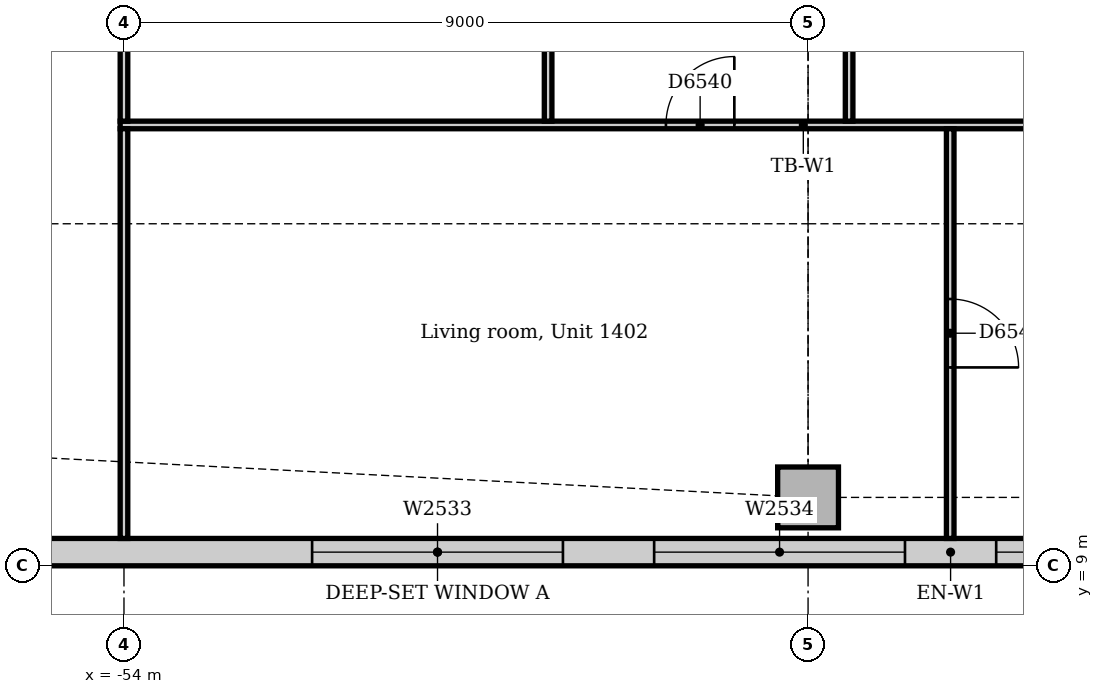
"""IFC4 building model, lengths in metres.
Left out: names, types, materials, properties, quantities, classifications, styles, units other than length and angle.
Written with IfcOpenShell. Run it as: python <this file> out.ifc"""

import sys

from ifc_helpers import new_model, si_unit, direction, frame, frame_2d, origin, origin_2d, place, context, subcontext, project, spatial, rectangle, extrude, element, fill, save


model = new_model("IFC4")
c1 = context("Model", 3, precision=1e-05, world=origin(), true_north=direction((0.0, 1.0)))
c2 = subcontext(c1, "Body", "Model", "MODEL_VIEW")
j1 = project(units=[si_unit("LENGTHUNIT", "METRE"), si_unit("PLANEANGLEUNIT", "RADIAN")], contexts=[c1])
p1 = place(None, origin())
s1 = spatial("IfcSite", under=j1, at=p1, CompositionType="ELEMENT")
p2 = place(p1, origin())
s2 = spatial("IfcBuilding", under=s1, at=p2, CompositionType="ELEMENT")
p3 = place(p2, frame((0.0, 0.0, 63.0)))
s3 = spatial("IfcBuildingStorey", under=s2, at=p3, CompositionType="ELEMENT", Elevation=63.0)
p4 = place(p3, frame((-45.0, 9.9, 0.0), z_axis=(0.0, 0.0, 1.0), x_axis=(1.0, 0.0, 0.0)))
e1 = element("IfcColumn", 1, at=p4, inside=s3, PredefinedType="COLUMN", context=c2, shape_type="SweptSolid", body=[
    extrude(rectangle(XDim=0.8, YDim=0.8, at=origin_2d()), origin(), (0.0, 0.0, 1.0), 3.85),
])
p5 = place(p3, frame((-55.007, 9.18, 0.0), z_axis=(0.0, 0.0, 1.0), x_axis=(1.0, 0.0, 0.0)))
e2 = element("IfcWall", 2, at=p5, inside=s3, PredefinedType="STANDARD", context=c2, shape_type="SweptSolid", body=[
    extrude(rectangle(XDim=23.765, YDim=0.36, at=frame_2d((11.882, 0.0))), origin(), (0.0, 0.0, 1.0), 3.85),
])
p6 = place(p5, frame((3.482, 0.0, 0.9)))
e3 = element("IfcOpeningElement", 3, at=p6, cuts=e2, PredefinedType="OPENING", context=c2, shape_type="SweptSolid", body=[
    extrude(rectangle(XDim=3.3, YDim=1.6, at=frame_2d((1.65, 0.8))), frame((0.0, 0.19, 0.0), z_axis=(0.0, -1.0, 0.0), x_axis=(1.0, 0.0, 0.0)), (0.0, 0.0, 1.0), 0.38),
])
p7 = place(p5, frame((7.982, 0.0, 0.9)))
e4 = element("IfcOpeningElement", 4, at=p7, cuts=e2, PredefinedType="OPENING", context=c2, shape_type="SweptSolid", body=[
    extrude(rectangle(XDim=3.3, YDim=1.6, at=frame_2d((1.65, 0.8))), frame((0.0, 0.19, 0.0), z_axis=(0.0, -1.0, 0.0), x_axis=(1.0, 0.0, 0.0)), (0.0, 0.0, 1.0), 0.38),
])
p8 = place(p5, frame((12.482, 0.0, 0.9)))
e5 = element("IfcOpeningElement", 5, at=p8, cuts=e2, PredefinedType="OPENING", context=c2, shape_type="SweptSolid", body=[
    extrude(rectangle(XDim=3.3, YDim=1.6, at=frame_2d((1.65, 0.8))), frame((0.0, 0.19, 0.0), z_axis=(0.0, -1.0, 0.0), x_axis=(1.0, 0.0, 0.0)), (0.0, 0.0, 1.0), 0.38),
])
p9 = place(p5, frame((16.982, 0.0, 0.9)))
e6 = element("IfcOpeningElement", 6, at=p9, cuts=e2, PredefinedType="OPENING", context=c2, shape_type="SweptSolid", body=[
    extrude(rectangle(XDim=3.3, YDim=1.6, at=frame_2d((1.65, 0.8))), frame((0.0, 0.19, 0.0), z_axis=(0.0, -1.0, 0.0), x_axis=(1.0, 0.0, 0.0)), (0.0, 0.0, 1.0), 0.38),
])
p10 = place(p5, frame((21.424, 0.0, 0.9)))
e7 = element("IfcOpeningElement", 7, at=p10, cuts=e2, PredefinedType="OPENING", context=c2, shape_type="SweptSolid", body=[
    extrude(rectangle(XDim=1.8, YDim=1.6, at=frame_2d((0.9, 0.8))), frame((0.0, 0.19, 0.0), z_axis=(0.0, -1.0, 0.0), x_axis=(1.0, 0.0, 0.0)), (0.0, 0.0, 1.0), 0.38),
])
p11 = place(p3, frame((-54.05, 14.8, 0.0), z_axis=(0.0, 0.0, 1.0), x_axis=(1.0, 0.0, 0.0)))
e8 = element("IfcWall", 8, at=p11, inside=s3, PredefinedType="PARTITIONING", context=c2, shape_type="SweptSolid", body=[
    extrude(rectangle(XDim=17.975, YDim=0.1, at=frame_2d((8.988, 0.0))), origin(), (0.0, 0.0, 1.0), 3.85),
])
p12 = place(p11, frame((7.18, 0.0, 0.0)))
e9 = element("IfcOpeningElement", 9, at=p12, cuts=e8, PredefinedType="OPENING", context=c2, shape_type="SweptSolid", body=[
    extrude(rectangle(XDim=0.9, YDim=2.1, at=frame_2d((0.45, 1.05))), frame((0.0, 0.06, 0.0), z_axis=(0.0, -1.0, 0.0), x_axis=(1.0, 0.0, 0.0)), (0.0, 0.0, 1.0), 0.12),
])
p13 = place(p3, frame((-54.0, 9.36, 0.0), z_axis=(0.0, 0.0, 1.0), x_axis=(0.0, 1.0, 0.0)))
e10 = element("IfcWall", 10, at=p13, inside=s3, PredefinedType="PARTITIONING", context=c2, shape_type="SweptSolid", body=[
    extrude(rectangle(XDim=5.39, YDim=0.1, at=frame_2d((2.695, 0.0))), origin(), (0.0, 0.0, 1.0), 3.256),
])
p14 = place(p3, frame((-54.0, 14.85, 0.0), z_axis=(0.0, 0.0, 1.0), x_axis=(0.0, 1.0, 0.0)))
e11 = element("IfcWall", 11, at=p14, inside=s3, PredefinedType="PARTITIONING", context=c2, shape_type="SweptSolid", body=[
    extrude(rectangle(XDim=2.8, YDim=0.1, at=frame_2d((1.4, 0.0))), origin(), (0.0, 0.0, 1.0), 3.256),
])
p15 = place(p3, frame((-43.13, 9.36, 0.0), z_axis=(0.0, 0.0, 1.0), x_axis=(0.0, 1.0, 0.0)))
e12 = element("IfcWall", 12, at=p15, inside=s3, PredefinedType="PARTITIONING", context=c2, shape_type="SweptSolid", body=[
    extrude(rectangle(XDim=5.39, YDim=0.1, at=frame_2d((2.695, 0.0))), origin(), (0.0, 0.0, 1.0), 3.85),
])
p16 = place(p15, frame((2.25, 0.0, 0.0)))
e13 = element("IfcOpeningElement", 13, at=p16, cuts=e12, PredefinedType="OPENING", context=c2, shape_type="SweptSolid", body=[
    extrude(rectangle(XDim=0.9, YDim=2.1, at=frame_2d((0.45, 1.05))), frame((0.0, 0.06, 0.0), z_axis=(0.0, -1.0, 0.0), x_axis=(1.0, 0.0, 0.0)), (0.0, 0.0, 1.0), 0.12),
])
p17 = place(p3, frame((-48.42, 14.85, 0.0), z_axis=(0.0, 0.0, 1.0), x_axis=(0.0, 1.0, 0.0)))
e14 = element("IfcWall", 14, at=p17, inside=s3, PredefinedType="PARTITIONING", context=c2, shape_type="SweptSolid", body=[
    extrude(rectangle(XDim=3.075, YDim=0.1, at=frame_2d((1.538, 0.0))), origin(), (0.0, 0.0, 1.0), 3.85),
])
p18 = place(p17, frame((1.1, 0.0, 0.0)))
e15 = element("IfcOpeningElement", 15, at=p18, cuts=e14, PredefinedType="OPENING", context=c2, shape_type="SweptSolid", body=[
    extrude(rectangle(XDim=0.9, YDim=2.1, at=frame_2d((0.45, 1.05))), frame((0.0, 0.06, 0.0), z_axis=(0.0, -1.0, 0.0), x_axis=(1.0, 0.0, 0.0)), (0.0, 0.0, 1.0), 0.12),
])
p19 = place(p3, frame((-44.46, 14.85, 0.0), z_axis=(0.0, 0.0, 1.0), x_axis=(0.0, 1.0, 0.0)))
e16 = element("IfcWall", 16, at=p19, inside=s3, PredefinedType="PARTITIONING", context=c2, shape_type="SweptSolid", body=[
    extrude(rectangle(XDim=3.075, YDim=0.1, at=frame_2d((1.538, 0.0))), origin(), (0.0, 0.0, 1.0), 3.85),
])
p20 = place(p19, frame((1.1, 0.0, 0.0)))
e17 = element("IfcOpeningElement", 17, at=p20, cuts=e16, PredefinedType="OPENING", context=c2, shape_type="SweptSolid", body=[
    extrude(rectangle(XDim=0.9, YDim=2.1, at=frame_2d((0.45, 1.05))), frame((0.0, 0.06, 0.0), z_axis=(0.0, -1.0, 0.0), x_axis=(1.0, 0.0, 0.0)), (0.0, 0.0, 1.0), 0.12),
])
p21 = place(p6, origin())
e18 = element("IfcWindow", 18, at=p21, inside=s3, PartitioningType="SINGLE_PANEL", PredefinedType="WINDOW", context=c2, shape_type="SweptSolid", body=[
    extrude(rectangle(XDim=3.3, YDim=1.6, at=frame_2d((1.65, 0.8))), frame((0.0, 0.13, 0.0), z_axis=(0.0, -1.0, 0.0), x_axis=(1.0, 0.0, 0.0)), (0.0, 0.0, 1.0), 0.06),
])
fill(e3, e18)
p22 = place(p7, origin())
e19 = element("IfcWindow", 19, at=p22, inside=s3, PartitioningType="SINGLE_PANEL", PredefinedType="WINDOW", context=c2, shape_type="SweptSolid", body=[
    extrude(rectangle(XDim=3.3, YDim=1.6, at=frame_2d((1.65, 0.8))), frame((0.0, 0.13, 0.0), z_axis=(0.0, -1.0, 0.0), x_axis=(1.0, 0.0, 0.0)), (0.0, 0.0, 1.0), 0.06),
])
fill(e4, e19)
p23 = place(p8, origin())
e20 = element("IfcWindow", 20, at=p23, inside=s3, PartitioningType="SINGLE_PANEL", PredefinedType="WINDOW", context=c2, shape_type="SweptSolid", body=[
    extrude(rectangle(XDim=3.3, YDim=1.6, at=frame_2d((1.65, 0.8))), frame((0.0, 0.13, 0.0), z_axis=(0.0, -1.0, 0.0), x_axis=(1.0, 0.0, 0.0)), (0.0, 0.0, 1.0), 0.06),
])
fill(e5, e20)
p24 = place(p12, origin())
e21 = element("IfcDoor", 21, at=p24, inside=s3, OperationType="SINGLE_SWING_RIGHT", PredefinedType="DOOR", context=c2, shape_type="SweptSolid", body=[
    extrude(rectangle(XDim=0.9, YDim=2.1, at=frame_2d((0.45, 1.05))), frame((0.0, 0.025, 0.0), z_axis=(0.0, -1.0, 0.0), x_axis=(1.0, 0.0, 0.0)), (0.0, 0.0, 1.0), 0.05),
])
fill(e9, e21)
p25 = place(p16, frame((0.9, 0.0, 0.0), z_axis=(0.0, 0.0, 1.0), x_axis=(-1.0, 0.0, 0.0)))
e22 = element("IfcDoor", 22, at=p25, inside=s3, OperationType="SINGLE_SWING_RIGHT", PredefinedType="DOOR", context=c2, shape_type="SweptSolid", body=[
    extrude(rectangle(XDim=0.9, YDim=2.1, at=frame_2d((0.45, 1.05))), frame((0.0, 0.025, 0.0), z_axis=(0.0, -1.0, 0.0), x_axis=(1.0, 0.0, 0.0)), (0.0, 0.0, 1.0), 0.05),
])
fill(e13, e22)
save(model, sys.argv[1])
